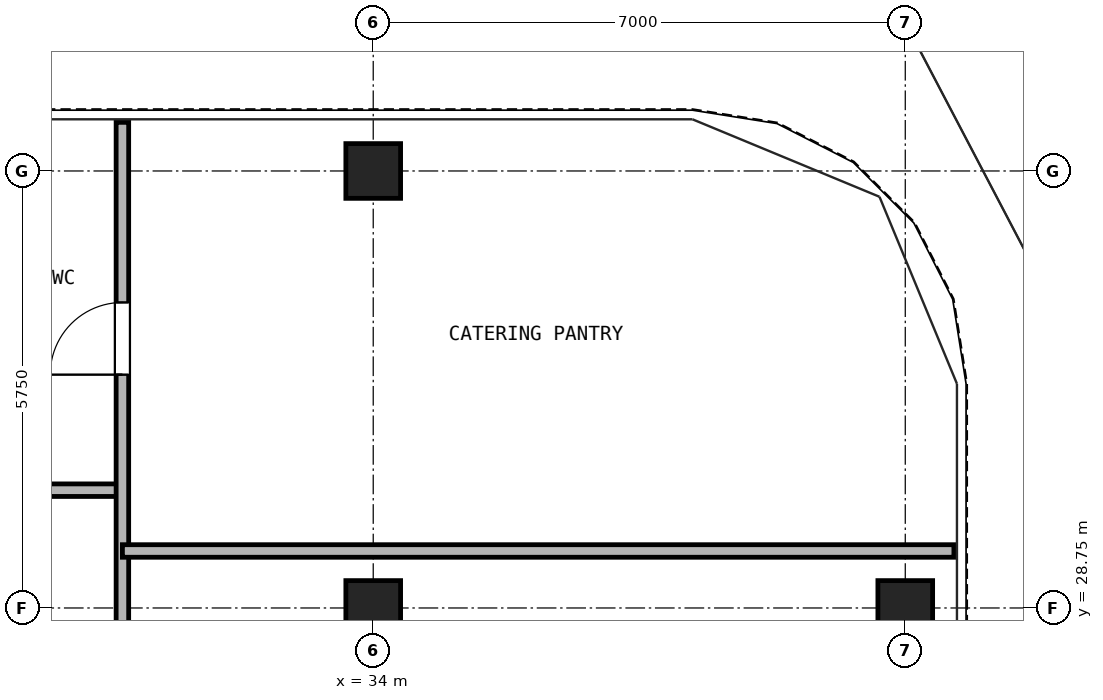
"""IFC4 building model, lengths in metres.
Left out: names, types, materials, properties, quantities, classifications, styles, units other than length and angle.
Written with IfcOpenShell. Run it as: python <this file> out.ifc"""

import sys

from ifc_helpers import new_model, si_unit, direction, frame, frame_2d, origin, origin_2d, place, context, subcontext, project, spatial, rectangle, hollow_rectangle, extrude, source, transform, mapped, element, fill, save


model = new_model("IFC4")
c1 = context("Model", 3, precision=1e-05, world=origin(), true_north=direction((0.0, 1.0)))
c2 = subcontext(c1, "Body", "Model", "MODEL_VIEW")
j1 = project(units=[si_unit("LENGTHUNIT", "METRE"), si_unit("PLANEANGLEUNIT", "RADIAN")], contexts=[c1])
p1 = place(None, origin())
s1 = spatial("IfcSite", under=j1, at=p1, CompositionType="ELEMENT")
p2 = place(p1, origin())
s2 = spatial("IfcBuilding", under=s1, at=p2, CompositionType="ELEMENT")
p3 = place(p2, frame((0.0, 0.0, 184.9)))
s3 = spatial("IfcBuildingStorey", under=s2, at=p3, CompositionType="ELEMENT", Elevation=184.9)
m1 = source(origin(), c2, "Body", "SweptSolid", [
    extrude(hollow_rectangle(XDim=0.72, YDim=0.72, WallThickness=0.04, at=origin_2d()), origin(), (0.0, 0.0, 1.0), 2.84),
])
for number, where, z_axis, x_axis in (
    (1, (34.0, 34.5, 0.0), (0.0, 0.0, 1.0), (1.0, 0.0, 0.0)),
    (2, (41.0, 28.75, 0.0), (0.0, 0.0, 1.0), (1.0, 0.0, 0.0)),
    (3, (34.0, 28.75, 0.0), (0.0, 0.0, 1.0), (1.0, 0.0, 0.0)),
):
    element("IfcColumn", number, at=place(p3, frame(where, z_axis=z_axis, x_axis=x_axis)), inside=s3, PredefinedType="COLUMN", context=c2, shape_type="MappedRepresentation", body=[
        mapped(m1, transform((0.0, 0.0, 0.0), x_axis=(1.0, 0.0, 0.0), y_axis=(0.0, 1.0, 0.0), z_axis=(0.0, 0.0, 1.0), scale=1.0)),
    ])
p4 = place(p3, frame((16.3, 30.3, 0.0), z_axis=(0.0, 0.0, 1.0), x_axis=(1.0, 0.0, 0.0)))
e4 = element("IfcWall", 4, at=p4, inside=s3, PredefinedType="PARTITIONING", context=c2, shape_type="SweptSolid", body=[
    extrude(rectangle(XDim=14.4, YDim=0.165, at=frame_2d((7.2, 0.0))), origin(), (0.0, 0.0, 1.0), 2.84),
])
p5 = place(p4, frame((3.1, 0.0, 0.0)))
e5 = element("IfcOpeningElement", 5, at=p5, cuts=e4, PredefinedType="OPENING", context=c2, shape_type="SweptSolid", body=[
    extrude(rectangle(XDim=0.95, YDim=2.15, at=frame_2d((0.475, 1.075))), frame((0.0, 0.093, 0.0), z_axis=(0.0, -1.0, 0.0), x_axis=(1.0, 0.0, 0.0)), (0.0, 0.0, 1.0), 0.185),
])
p6 = place(p4, frame((8.0, 0.0, 0.0)))
e6 = element("IfcOpeningElement", 6, at=p6, cuts=e4, PredefinedType="OPENING", context=c2, shape_type="SweptSolid", body=[
    extrude(rectangle(XDim=0.95, YDim=2.15, at=frame_2d((0.475, 1.075))), frame((0.0, 0.093, 0.0), z_axis=(0.0, -1.0, 0.0), x_axis=(1.0, 0.0, 0.0)), (0.0, 0.0, 1.0), 0.185),
])
p7 = place(p4, frame((10.8, 0.0, 0.0)))
e7 = element("IfcOpeningElement", 7, at=p7, cuts=e4, PredefinedType="OPENING", context=c2, shape_type="SweptSolid", body=[
    extrude(rectangle(XDim=0.92, YDim=2.1, at=frame_2d((0.46, 1.05))), frame((0.0, 0.093, 0.0), z_axis=(0.0, -1.0, 0.0), x_axis=(1.0, 0.0, 0.0)), (0.0, 0.0, 1.0), 0.185),
])
p8 = place(p3, frame((30.7, 11.2, 0.0), z_axis=(0.0, 0.0, 1.0), x_axis=(0.0, 1.0, 0.0)))
e8 = element("IfcWall", 8, at=p8, inside=s3, PredefinedType="PARTITIONING", context=c2, shape_type="SweptSolid", body=[
    extrude(rectangle(XDim=23.94, YDim=0.165, at=frame_2d((11.97, 0.0))), origin(), (0.0, 0.0, 1.0), 2.84),
])
p9 = place(p8, frame((5.15, 0.0, 0.0)))
e9 = element("IfcOpeningElement", 9, at=p9, cuts=e8, PredefinedType="OPENING", context=c2, shape_type="SweptSolid", body=[
    extrude(rectangle(XDim=0.95, YDim=2.15, at=frame_2d((0.475, 1.075))), frame((0.0, 0.093, 0.0), z_axis=(0.0, -1.0, 0.0), x_axis=(1.0, 0.0, 0.0)), (0.0, 0.0, 1.0), 0.185),
])
p10 = place(p8, frame((14.3, 0.0, 0.0)))
e10 = element("IfcOpeningElement", 10, at=p10, cuts=e8, PredefinedType="OPENING", context=c2, shape_type="SweptSolid", body=[
    extrude(rectangle(XDim=0.95, YDim=2.15, at=frame_2d((0.475, 1.075))), frame((0.0, 0.093, 0.0), z_axis=(0.0, -1.0, 0.0), x_axis=(1.0, 0.0, 0.0)), (0.0, 0.0, 1.0), 0.185),
])
p11 = place(p8, frame((20.62, 0.0, 0.0)))
e11 = element("IfcOpeningElement", 11, at=p11, cuts=e8, PredefinedType="OPENING", context=c2, shape_type="SweptSolid", body=[
    extrude(rectangle(XDim=0.95, YDim=2.15, at=frame_2d((0.475, 1.075))), frame((0.0, 0.093, 0.0), z_axis=(0.0, -1.0, 0.0), x_axis=(1.0, 0.0, 0.0)), (0.0, 0.0, 1.0), 0.185),
])
p12 = place(p3, frame((30.7, 29.5, 0.0), z_axis=(0.0, 0.0, 1.0), x_axis=(1.0, 0.0, 0.0)))
e12 = element("IfcWall", 12, at=p12, inside=s3, PredefinedType="PARTITIONING", context=c2, shape_type="SweptSolid", body=[
    extrude(rectangle(XDim=10.94, YDim=0.165, at=frame_2d((5.47, 0.0))), origin(), (0.0, 0.0, 1.0), 2.84),
])
p13 = place(p11, origin())
e13 = element("IfcDoor", 13, at=p13, inside=s3, OperationType="SINGLE_SWING_LEFT", PredefinedType="DOOR", context=c2, shape_type="SweptSolid", body=[
    extrude(rectangle(XDim=0.95, YDim=2.15, at=frame_2d((0.475, 1.075))), frame((0.0, 0.025, 0.0), z_axis=(0.0, -1.0, 0.0), x_axis=(1.0, 0.0, 0.0)), (0.0, 0.0, 1.0), 0.05),
])
fill(e11, e13)
save(model, sys.argv[1])
